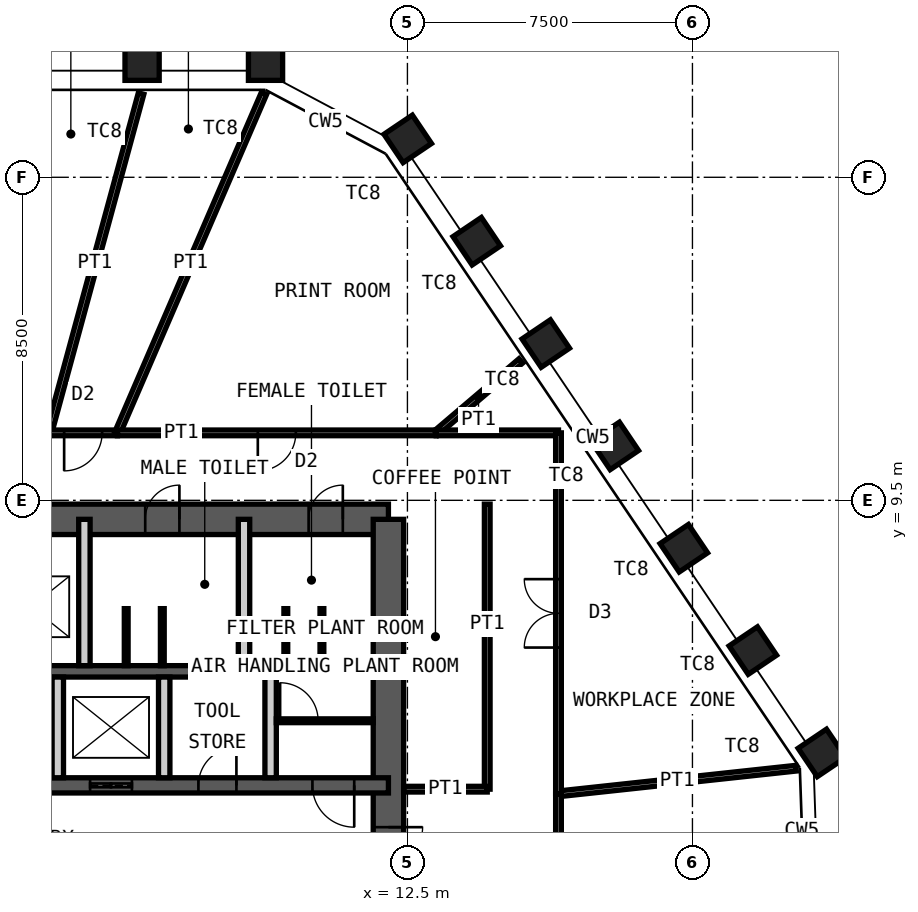
"""IFC4 building model, lengths in metres.
Left out: names, types, materials, properties, quantities, classifications, styles, units other than length and angle.
Written with IfcOpenShell. Run it as: python <this file> out.ifc"""

import sys

from ifc_helpers import new_model, si_unit, direction, frame, frame_2d, origin, origin_2d, place, context, subcontext, project, spatial, rectangle, hollow_rectangle, extrude, element, fill, save


model = new_model("IFC4")
c1 = context("Model", 3, precision=1e-05, world=origin(), true_north=direction((0.0, 1.0)))
c2 = subcontext(c1, "Body", "Model", "MODEL_VIEW")
j1 = project(units=[si_unit("LENGTHUNIT", "METRE"), si_unit("PLANEANGLEUNIT", "RADIAN")], contexts=[c1])
p1 = place(None, origin())
s1 = spatial("IfcSite", under=j1, at=p1, CompositionType="ELEMENT")
p2 = place(p1, origin())
s2 = spatial("IfcBuilding", under=s1, at=p2, CompositionType="ELEMENT")
p3 = place(p2, frame((0.0, 0.0, 312.4)))
s3 = spatial("IfcBuildingStorey", under=s2, at=p3, CompositionType="ELEMENT", Elevation=312.4)
for number, where, z_axis, x_axis in (
    (1, (5.518, 21.0, 0.0), (0.0, 0.0, 1.0), (-1.0, 0.0, 0.0)),
    (2, (8.766, 21.0, 0.0), (0.0, 0.0, 1.0), (-1.0, 0.0, 0.0)),
    (3, (12.508, 19.01, 0.0), (0.0, 0.0, 1.0), (-0.559, 0.829, 0.0)),
    (4, (14.324, 16.318, 0.0), (0.0, 0.0, 1.0), (-0.559, 0.829, 0.0)),
    (5, (16.141, 13.625, 0.0), (0.0, 0.0, 1.0), (-0.559, 0.829, 0.0)),
    (6, (17.957, 10.932, 0.0), (0.0, 0.0, 1.0), (-0.559, 0.829, 0.0)),
    (7, (19.773, 8.239, 0.0), (0.0, 0.0, 1.0), (-0.559, 0.829, 0.0)),
    (8, (21.589, 5.547, 0.0), (0.0, 0.0, 1.0), (-0.559, 0.829, 0.0)),
    (9, (23.406, 2.854, 0.0), (0.0, 0.0, 1.0), (-0.559, 0.829, 0.0)),
):
    element("IfcColumn", number, at=place(p3, frame(where, z_axis=z_axis, x_axis=x_axis)), inside=s3, PredefinedType="COLUMN", context=c2, shape_type="SweptSolid", body=[
        extrude(hollow_rectangle(XDim=0.9, YDim=0.9, WallThickness=0.05, at=origin_2d()), origin(), (0.0, 0.0, 1.0), 4.2),
    ])
p4 = place(p3, frame((-12.0, 9.0, 0.0), z_axis=(0.0, 0.0, 1.0), x_axis=(1.0, 0.0, 0.0)))
e10 = element("IfcWall", 10, at=p4, inside=s3, PredefinedType="SHEAR", context=c2, shape_type="SweptSolid", body=[
    extrude(rectangle(XDim=24.0, YDim=0.8, at=frame_2d((12.0, 0.0))), origin(), (0.0, 0.0, 1.0), 4.2),
])
p5 = place(p4, frame((10.4, 0.0, 0.0)))
e11 = element("IfcOpeningElement", 11, at=p5, cuts=e10, PredefinedType="OPENING", context=c2, shape_type="SweptSolid", body=[
    extrude(rectangle(XDim=1.0, YDim=2.1, at=frame_2d((0.5, 1.05))), frame((0.0, 0.41, 0.0), z_axis=(0.0, -1.0, 0.0), x_axis=(1.0, 0.0, 0.0)), (0.0, 0.0, 1.0), 0.82),
])
p6 = place(p4, frame((17.6, 0.0, 0.0)))
e12 = element("IfcOpeningElement", 12, at=p6, cuts=e10, PredefinedType="OPENING", context=c2, shape_type="SweptSolid", body=[
    extrude(rectangle(XDim=0.9, YDim=2.1, at=frame_2d((0.45, 1.05))), frame((0.0, 0.41, 0.0), z_axis=(0.0, -1.0, 0.0), x_axis=(1.0, 0.0, 0.0)), (0.0, 0.0, 1.0), 0.82),
])
p7 = place(p4, frame((21.9, 0.0, 0.0)))
e13 = element("IfcOpeningElement", 13, at=p7, cuts=e10, PredefinedType="OPENING", context=c2, shape_type="SweptSolid", body=[
    extrude(rectangle(XDim=0.9, YDim=2.1, at=frame_2d((0.45, 1.05))), frame((0.0, 0.41, 0.0), z_axis=(0.0, -1.0, 0.0), x_axis=(1.0, 0.0, 0.0)), (0.0, 0.0, 1.0), 0.82),
])
p8 = place(p3, frame((12.0, -9.0, 0.0), z_axis=(0.0, 0.0, 1.0), x_axis=(0.0, 1.0, 0.0)))
e14 = element("IfcWall", 14, at=p8, inside=s3, PredefinedType="SHEAR", context=c2, shape_type="SweptSolid", body=[
    extrude(rectangle(XDim=18.0, YDim=0.8, at=frame_2d((9.0, 0.0))), origin(), (0.0, 0.0, 1.0), 4.2),
])
p9 = place(p8, frame((8.1, 0.0, 0.0)))
e15 = element("IfcOpeningElement", 15, at=p9, cuts=e14, PredefinedType="OPENING", context=c2, shape_type="SweptSolid", body=[
    extrude(rectangle(XDim=1.8, YDim=2.1, at=frame_2d((0.9, 1.05))), frame((0.0, 0.41, 0.0), z_axis=(0.0, -1.0, 0.0), x_axis=(1.0, 0.0, 0.0)), (0.0, 0.0, 1.0), 0.82),
])
p10 = place(p3, frame((-12.0, 5.0, 0.0), z_axis=(0.0, 0.0, 1.0), x_axis=(1.0, 0.0, 0.0)))
e16 = element("IfcWall", 16, at=p10, inside=s3, PredefinedType="SHEAR", context=c2, shape_type="SweptSolid", body=[
    extrude(rectangle(XDim=24.0, YDim=0.3, at=frame_2d((12.0, 0.0))), origin(), (0.0, 0.0, 1.0), 4.2),
])
p11 = place(p3, frame((-12.0, 2.0, 0.0), z_axis=(0.0, 0.0, 1.0), x_axis=(1.0, 0.0, 0.0)))
e17 = element("IfcWall", 17, at=p11, inside=s3, PredefinedType="SHEAR", context=c2, shape_type="SweptSolid", body=[
    extrude(rectangle(XDim=24.0, YDim=0.4, at=frame_2d((12.0, 0.0))), origin(), (0.0, 0.0, 1.0), 4.2),
])
p12 = place(p11, frame((2.4, 0.0, 0.0)))
e18 = element("IfcOpeningElement", 18, at=p12, cuts=e17, PredefinedType="OPENING", context=c2, shape_type="SweptSolid", body=[
    extrude(rectangle(XDim=1.1, YDim=2.1, at=frame_2d((0.55, 1.05))), frame((0.0, 0.21, 0.0), z_axis=(0.0, -1.0, 0.0), x_axis=(1.0, 0.0, 0.0)), (0.0, 0.0, 1.0), 0.42),
])
p13 = place(p11, frame((22.0, 0.0, 0.0)))
e19 = element("IfcOpeningElement", 19, at=p13, cuts=e17, PredefinedType="OPENING", context=c2, shape_type="SweptSolid", body=[
    extrude(rectangle(XDim=1.1, YDim=2.1, at=frame_2d((0.55, 1.05))), frame((0.0, 0.21, 0.0), z_axis=(0.0, -1.0, 0.0), x_axis=(1.0, 0.0, 0.0)), (0.0, 0.0, 1.0), 0.42),
])
p14 = place(p11, frame((10.15, 0.0, 0.0)))
e20 = element("IfcOpeningElement", 20, at=p14, cuts=e17, PredefinedType="OPENING", context=c2, shape_type="SweptSolid", body=[
    extrude(rectangle(XDim=1.0, YDim=2.1, at=frame_2d((0.5, 1.05))), frame((0.0, 0.21, 0.0), z_axis=(0.0, -1.0, 0.0), x_axis=(1.0, 0.0, 0.0)), (0.0, 0.0, 1.0), 0.42),
])
p15 = place(p11, frame((6.9, 0.0, 0.0)))
e21 = element("IfcOpeningElement", 21, at=p15, cuts=e17, PredefinedType="OPENING", context=c2, shape_type="SweptSolid", body=[
    extrude(rectangle(XDim=1.0, YDim=2.1, at=frame_2d((0.5, 1.05))), frame((0.0, 0.21, 0.0), z_axis=(0.0, -1.0, 0.0), x_axis=(1.0, 0.0, 0.0)), (0.0, 0.0, 1.0), 0.42),
])
p16 = place(p11, frame((13.35, 0.0, 0.0)))
e22 = element("IfcOpeningElement", 22, at=p16, cuts=e17, PredefinedType="OPENING", context=c2, shape_type="SweptSolid", body=[
    extrude(rectangle(XDim=1.1, YDim=2.4, at=frame_2d((0.55, 1.2))), frame((0.0, 0.21, 0.0), z_axis=(0.0, -1.0, 0.0), x_axis=(1.0, 0.0, 0.0)), (0.0, 0.0, 1.0), 0.42),
])
p17 = place(p11, frame((16.15, 0.0, 0.0)))
e23 = element("IfcOpeningElement", 23, at=p17, cuts=e17, PredefinedType="OPENING", context=c2, shape_type="SweptSolid", body=[
    extrude(rectangle(XDim=1.1, YDim=2.4, at=frame_2d((0.55, 1.2))), frame((0.0, 0.21, 0.0), z_axis=(0.0, -1.0, 0.0), x_axis=(1.0, 0.0, 0.0)), (0.0, 0.0, 1.0), 0.42),
])
p18 = place(p11, frame((19.0, 0.0, 0.0)))
e24 = element("IfcOpeningElement", 24, at=p18, cuts=e17, PredefinedType="OPENING", context=c2, shape_type="SweptSolid", body=[
    extrude(rectangle(XDim=1.0, YDim=2.1, at=frame_2d((0.5, 1.05))), frame((0.0, 0.21, 0.0), z_axis=(0.0, -1.0, 0.0), x_axis=(1.0, 0.0, 0.0)), (0.0, 0.0, 1.0), 0.42),
])
for number, where, z_axis, x_axis in (
    (25, (4.0, 5.15, 0.0), (0.0, 0.0, 1.0), (0.0, 1.0, 0.0)),
    (26, (8.2, 5.15, 0.0), (0.0, 0.0, 1.0), (0.0, 1.0, 0.0)),
):
    element("IfcWall", number, at=place(p3, frame(where, z_axis=z_axis, x_axis=x_axis)), inside=s3, PredefinedType="PARTITIONING", context=c2, shape_type="SweptSolid", body=[
        extrude(rectangle(XDim=3.85, YDim=0.3, at=frame_2d((1.925, 0.0))), origin(), (0.0, 0.0, 1.0), 3.98),
    ])
for number, where, z_axis, x_axis in (
    (27, (3.3, 2.2, 0.0), (0.0, 0.0, 1.0), (0.0, 1.0, 0.0)),
    (28, (6.1, 2.2, 0.0), (0.0, 0.0, 1.0), (0.0, 1.0, 0.0)),
    (29, (8.9, 2.2, 0.0), (0.0, 0.0, 1.0), (0.0, 1.0, 0.0)),
):
    element("IfcWall", number, at=place(p3, frame(where, z_axis=z_axis, x_axis=x_axis)), inside=s3, PredefinedType="PARTITIONING", context=c2, shape_type="SweptSolid", body=[
        extrude(rectangle(XDim=2.65, YDim=0.3, at=frame_2d((1.325, 0.0))), origin(), (0.0, 0.0, 1.0), 3.98),
    ])
p19 = place(p3, frame((9.05, 3.7, 0.0), z_axis=(0.0, 0.0, 1.0), x_axis=(1.0, 0.0, 0.0)))
e30 = element("IfcWall", 30, at=p19, inside=s3, PredefinedType="PARTITIONING", context=c2, shape_type="SweptSolid", body=[
    extrude(rectangle(XDim=2.55, YDim=0.1, at=frame_2d((1.275, 0.0))), origin(), (0.0, 0.0, 1.0), 3.98),
])
p20 = place(p19, frame((0.1, 0.0, 0.0)))
e31 = element("IfcOpeningElement", 31, at=p20, cuts=e30, PredefinedType="OPENING", context=c2, shape_type="SweptSolid", body=[
    extrude(rectangle(XDim=1.0, YDim=2.4, at=frame_2d((0.5, 1.2))), frame((0.0, 0.06, 0.0), z_axis=(0.0, -1.0, 0.0), x_axis=(1.0, 0.0, 0.0)), (0.0, 0.0, 1.0), 0.12),
])
for number, where, z_axis, x_axis in (
    (32, (5.1, 5.15, 0.0), (0.0, 0.0, 1.0), (0.0, 1.0, 0.0)),
    (33, (6.05, 5.15, 0.0), (0.0, 0.0, 1.0), (0.0, 1.0, 0.0)),
    (34, (9.3, 5.15, 0.0), (0.0, 0.0, 1.0), (0.0, 1.0, 0.0)),
    (35, (10.25, 5.15, 0.0), (0.0, 0.0, 1.0), (0.0, 1.0, 0.0)),
):
    element("IfcWall", number, at=place(p3, frame(where, z_axis=z_axis, x_axis=x_axis)), inside=s3, PredefinedType="PARTITIONING", context=c2, shape_type="SweptSolid", body=[
        extrude(rectangle(XDim=1.5, YDim=0.1, at=frame_2d((0.75, 0.0))), origin(), (0.0, 0.0, 1.0), 2.1),
    ])
p21 = place(p3, frame((22.726, 2.452, 0.0), z_axis=(0.0, 0.0, 1.0), x_axis=(-0.994231470971, -0.107255685772, 0.0)))
e36 = element("IfcWall", 36, at=p21, inside=s3, PredefinedType="PARTITIONING", context=c2, shape_type="SweptSolid", body=[
    extrude(rectangle(XDim=6.287, YDim=0.15, at=frame_2d((3.144, 0.0))), origin(), (0.0, 0.0, 1.0), 4.03),
])
p22 = place(p3, frame((16.475, 1.777, 0.0), z_axis=(0.0, 0.0, 1.0), x_axis=(0.0, -1.0, 0.0)))
e37 = element("IfcWall", 37, at=p22, inside=s3, PredefinedType="PARTITIONING", context=c2, shape_type="SweptSolid", body=[
    extrude(rectangle(XDim=10.259, YDim=0.15, at=frame_2d((5.13, 0.0))), origin(), (0.0, 0.0, 1.0), 4.03),
])
p23 = place(p22, frame((4.23, 0.0, 0.0)))
e38 = element("IfcOpeningElement", 38, at=p23, cuts=e37, PredefinedType="OPENING", context=c2, shape_type="SweptSolid", body=[
    extrude(rectangle(XDim=1.8, YDim=2.4, at=frame_2d((0.9, 1.2))), frame((0.0, 0.085, 0.0), z_axis=(0.0, -1.0, 0.0), x_axis=(1.0, 0.0, 0.0)), (0.0, 0.0, 1.0), 0.17),
])
p24 = place(p3, frame((5.492, 20.204, 0.0), z_axis=(0.0, 0.0, 1.0), x_axis=(-0.262302393053, -0.964985727666, 0.0)))
e39 = element("IfcWall", 39, at=p24, inside=s3, PredefinedType="PARTITIONING", context=c2, shape_type="SweptSolid", body=[
    extrude(rectangle(XDim=9.253, YDim=0.15, at=frame_2d((4.626, 0.0))), origin(), (0.0, 0.0, 1.0), 3.33),
])
p25 = place(p3, frame((3.065, 11.275, 0.0), z_axis=(0.0, 0.0, 1.0), x_axis=(1.0, 0.0, 0.0)))
e40 = element("IfcWall", 40, at=p25, inside=s3, PredefinedType="PARTITIONING", context=c2, shape_type="SweptSolid", body=[
    extrude(rectangle(XDim=1.804, YDim=0.15, at=frame_2d((0.902, 0.0))), origin(), (0.0, 0.0, 1.0), 4.03),
])
p26 = place(p25, frame((0.402, 0.0, 0.0)))
e41 = element("IfcOpeningElement", 41, at=p26, cuts=e40, PredefinedType="OPENING", context=c2, shape_type="SweptSolid", body=[
    extrude(rectangle(XDim=1.0, YDim=2.4, at=frame_2d((0.5, 1.2))), frame((0.0, 0.085, 0.0), z_axis=(0.0, -1.0, 0.0), x_axis=(1.0, 0.0, 0.0)), (0.0, 0.0, 1.0), 0.17),
])
p27 = place(p3, frame((8.726, 20.208, 0.0), z_axis=(0.0, 0.0, 1.0), x_axis=(-0.39644322536, -0.918059240499, 0.0)))
e42 = element("IfcWall", 42, at=p27, inside=s3, PredefinedType="PARTITIONING", context=c2, shape_type="SweptSolid", body=[
    extrude(rectangle(XDim=9.731, YDim=0.15, at=frame_2d((4.865, 0.0))), origin(), (0.0, 0.0, 1.0), 2.93),
])
p28 = place(p3, frame((4.869, 11.275, 0.0), z_axis=(0.0, 0.0, 1.0), x_axis=(1.0, 0.0, 0.0)))
e43 = element("IfcWall", 43, at=p28, inside=s3, PredefinedType="PARTITIONING", context=c2, shape_type="SweptSolid", body=[
    extrude(rectangle(XDim=8.389, YDim=0.15, at=frame_2d((4.194, 0.0))), origin(), (0.0, 0.0, 1.0), 4.03),
])
p29 = place(p28, frame((3.694, 0.0, 0.0)))
e44 = element("IfcOpeningElement", 44, at=p29, cuts=e43, PredefinedType="OPENING", context=c2, shape_type="SweptSolid", body=[
    extrude(rectangle(XDim=1.0, YDim=2.4, at=frame_2d((0.5, 1.2))), frame((0.0, 0.085, 0.0), z_axis=(0.0, -1.0, 0.0), x_axis=(1.0, 0.0, 0.0)), (0.0, 0.0, 1.0), 0.17),
])
p30 = place(p3, frame((15.484, 13.169, 0.0), z_axis=(0.0, 0.0, 1.0), x_axis=(-0.761733198285, -0.647890835427, 0.0)))
e45 = element("IfcWall", 45, at=p30, inside=s3, PredefinedType="PARTITIONING", context=c2, shape_type="SweptSolid", body=[
    extrude(rectangle(XDim=2.923, YDim=0.15, at=frame_2d((1.461, 0.0))), origin(), (0.0, 0.0, 1.0), 3.33),
])
p31 = place(p3, frame((13.257, 11.275, 0.0), z_axis=(0.0, 0.0, 1.0), x_axis=(1.0, 0.0, 0.0)))
e46 = element("IfcWall", 46, at=p31, inside=s3, PredefinedType="PARTITIONING", context=c2, shape_type="SweptSolid", body=[
    extrude(rectangle(XDim=3.218, YDim=0.15, at=frame_2d((1.609, 0.0))), origin(), (0.0, 0.0, 1.0), 4.03),
])
p32 = place(p3, frame((16.475, 11.275, 0.0), z_axis=(0.0, 0.0, 1.0), x_axis=(0.0, -1.0, 0.0)))
e47 = element("IfcWall", 47, at=p32, inside=s3, PredefinedType="PARTITIONING", context=c2, shape_type="SweptSolid", body=[
    extrude(rectangle(XDim=9.498, YDim=0.15, at=frame_2d((4.749, 0.0))), origin(), (0.0, 0.0, 1.0), 4.03),
])
p33 = place(p32, frame((3.849, 0.0, 0.0)))
e48 = element("IfcOpeningElement", 48, at=p33, cuts=e47, PredefinedType="OPENING", context=c2, shape_type="SweptSolid", body=[
    extrude(rectangle(XDim=1.8, YDim=2.4, at=frame_2d((0.9, 1.2))), frame((0.0, 0.085, 0.0), z_axis=(0.0, -1.0, 0.0), x_axis=(1.0, 0.0, 0.0)), (0.0, 0.0, 1.0), 0.17),
])
p34 = place(p3, frame((14.6, 1.9, 0.0), z_axis=(0.0, 0.0, 1.0), x_axis=(0.0, 1.0, 0.0)))
e49 = element("IfcWall", 49, at=p34, inside=s3, PredefinedType="PARTITIONING", context=c2, shape_type="SweptSolid", body=[
    extrude(rectangle(XDim=7.5, YDim=0.15, at=frame_2d((3.75, 0.0))), origin(), (0.0, 0.0, 1.0), 4.03),
])
p35 = place(p3, frame((12.4, 1.9, 0.0), z_axis=(0.0, 0.0, 1.0), x_axis=(1.0, 0.0, 0.0)))
e50 = element("IfcWall", 50, at=p35, inside=s3, PredefinedType="PARTITIONING", context=c2, shape_type="SweptSolid", body=[
    extrude(rectangle(XDim=2.2, YDim=0.15, at=frame_2d((1.1, 0.0))), origin(), (0.0, 0.0, 1.0), 2.93),
])
p36 = place(p6, origin())
e51 = element("IfcDoor", 51, at=p36, inside=s3, OperationType="SINGLE_SWING_LEFT", PredefinedType="DOOR", context=c2, shape_type="SweptSolid", body=[
    extrude(rectangle(XDim=0.9, YDim=2.1, at=frame_2d((0.45, 1.05))), frame((0.0, 0.025, 0.0), z_axis=(0.0, -1.0, 0.0), x_axis=(1.0, 0.0, 0.0)), (0.0, 0.0, 1.0), 0.05),
])
fill(e12, e51)
p37 = place(p7, origin())
e52 = element("IfcDoor", 52, at=p37, inside=s3, OperationType="SINGLE_SWING_LEFT", PredefinedType="DOOR", context=c2, shape_type="SweptSolid", body=[
    extrude(rectangle(XDim=0.9, YDim=2.1, at=frame_2d((0.45, 1.05))), frame((0.0, 0.025, 0.0), z_axis=(0.0, -1.0, 0.0), x_axis=(1.0, 0.0, 0.0)), (0.0, 0.0, 1.0), 0.05),
])
fill(e13, e52)
p38 = place(p13, origin())
e53 = element("IfcDoor", 53, at=p38, inside=s3, OperationType="SINGLE_SWING_RIGHT", PredefinedType="DOOR", context=c2, shape_type="SweptSolid", body=[
    extrude(rectangle(XDim=1.1, YDim=2.1, at=frame_2d((0.55, 1.05))), frame((0.0, 0.025, 0.0), z_axis=(0.0, -1.0, 0.0), x_axis=(1.0, 0.0, 0.0)), (0.0, 0.0, 1.0), 0.05),
])
fill(e19, e53)
p39 = place(p9, origin())
e54 = element("IfcDoor", 54, at=p39, inside=s3, OperationType="DOUBLE_DOOR_DOUBLE_SWING", PredefinedType="DOOR", context=c2, shape_type="SweptSolid", body=[
    extrude(rectangle(XDim=1.8, YDim=2.1, at=frame_2d((0.9, 1.05))), frame((0.0, 0.025, 0.0), z_axis=(0.0, -1.0, 0.0), x_axis=(1.0, 0.0, 0.0)), (0.0, 0.0, 1.0), 0.05),
])
fill(e15, e54)
p40 = place(p17, origin())
e55 = element("IfcDoor", 55, at=p40, inside=s3, OperationType="DOUBLE_DOOR_SLIDING", PredefinedType="DOOR", context=c2, shape_type="SweptSolid", body=[
    extrude(rectangle(XDim=1.1, YDim=2.4, at=frame_2d((0.55, 1.2))), frame((0.0, 0.025, 0.0), z_axis=(0.0, -1.0, 0.0), x_axis=(1.0, 0.0, 0.0)), (0.0, 0.0, 1.0), 0.05),
])
fill(e23, e55)
p41 = place(p18, origin())
e56 = element("IfcDoor", 56, at=p41, inside=s3, OperationType="SINGLE_SWING_LEFT", PredefinedType="DOOR", context=c2, shape_type="SweptSolid", body=[
    extrude(rectangle(XDim=1.0, YDim=2.1, at=frame_2d((0.5, 1.05))), frame((0.0, 0.025, 0.0), z_axis=(0.0, -1.0, 0.0), x_axis=(1.0, 0.0, 0.0)), (0.0, 0.0, 1.0), 0.05),
])
fill(e24, e56)
p42 = place(p20, origin())
e57 = element("IfcDoor", 57, at=p42, inside=s3, OperationType="SINGLE_SWING_RIGHT", PredefinedType="DOOR", context=c2, shape_type="SweptSolid", body=[
    extrude(rectangle(XDim=1.0, YDim=2.4, at=frame_2d((0.5, 1.2))), frame((0.0, 0.025, 0.0), z_axis=(0.0, -1.0, 0.0), x_axis=(1.0, 0.0, 0.0)), (0.0, 0.0, 1.0), 0.05),
])
fill(e31, e57)
p43 = place(p26, origin())
e58 = element("IfcDoor", 58, at=p43, inside=s3, OperationType="SINGLE_SWING_LEFT", PredefinedType="DOOR", context=c2, shape_type="SweptSolid", body=[
    extrude(rectangle(XDim=1.0, YDim=2.4, at=frame_2d((0.5, 1.2))), frame((0.0, 0.025, 0.0), z_axis=(0.0, -1.0, 0.0), x_axis=(1.0, 0.0, 0.0)), (0.0, 0.0, 1.0), 0.05),
])
fill(e41, e58)
p44 = place(p29, origin())
e59 = element("IfcDoor", 59, at=p44, inside=s3, OperationType="SINGLE_SWING_LEFT", PredefinedType="DOOR", context=c2, shape_type="SweptSolid", body=[
    extrude(rectangle(XDim=1.0, YDim=2.4, at=frame_2d((0.5, 1.2))), frame((0.0, 0.025, 0.0), z_axis=(0.0, -1.0, 0.0), x_axis=(1.0, 0.0, 0.0)), (0.0, 0.0, 1.0), 0.05),
])
fill(e44, e59)
p45 = place(p33, origin())
e60 = element("IfcDoor", 60, at=p45, inside=s3, OperationType="DOUBLE_DOOR_DOUBLE_SWING", PredefinedType="DOOR", context=c2, shape_type="SweptSolid", body=[
    extrude(rectangle(XDim=1.8, YDim=2.4, at=frame_2d((0.9, 1.2))), frame((0.0, 0.025, 0.0), z_axis=(0.0, -1.0, 0.0), x_axis=(1.0, 0.0, 0.0)), (0.0, 0.0, 1.0), 0.05),
])
fill(e48, e60)
save(model, sys.argv[1])
